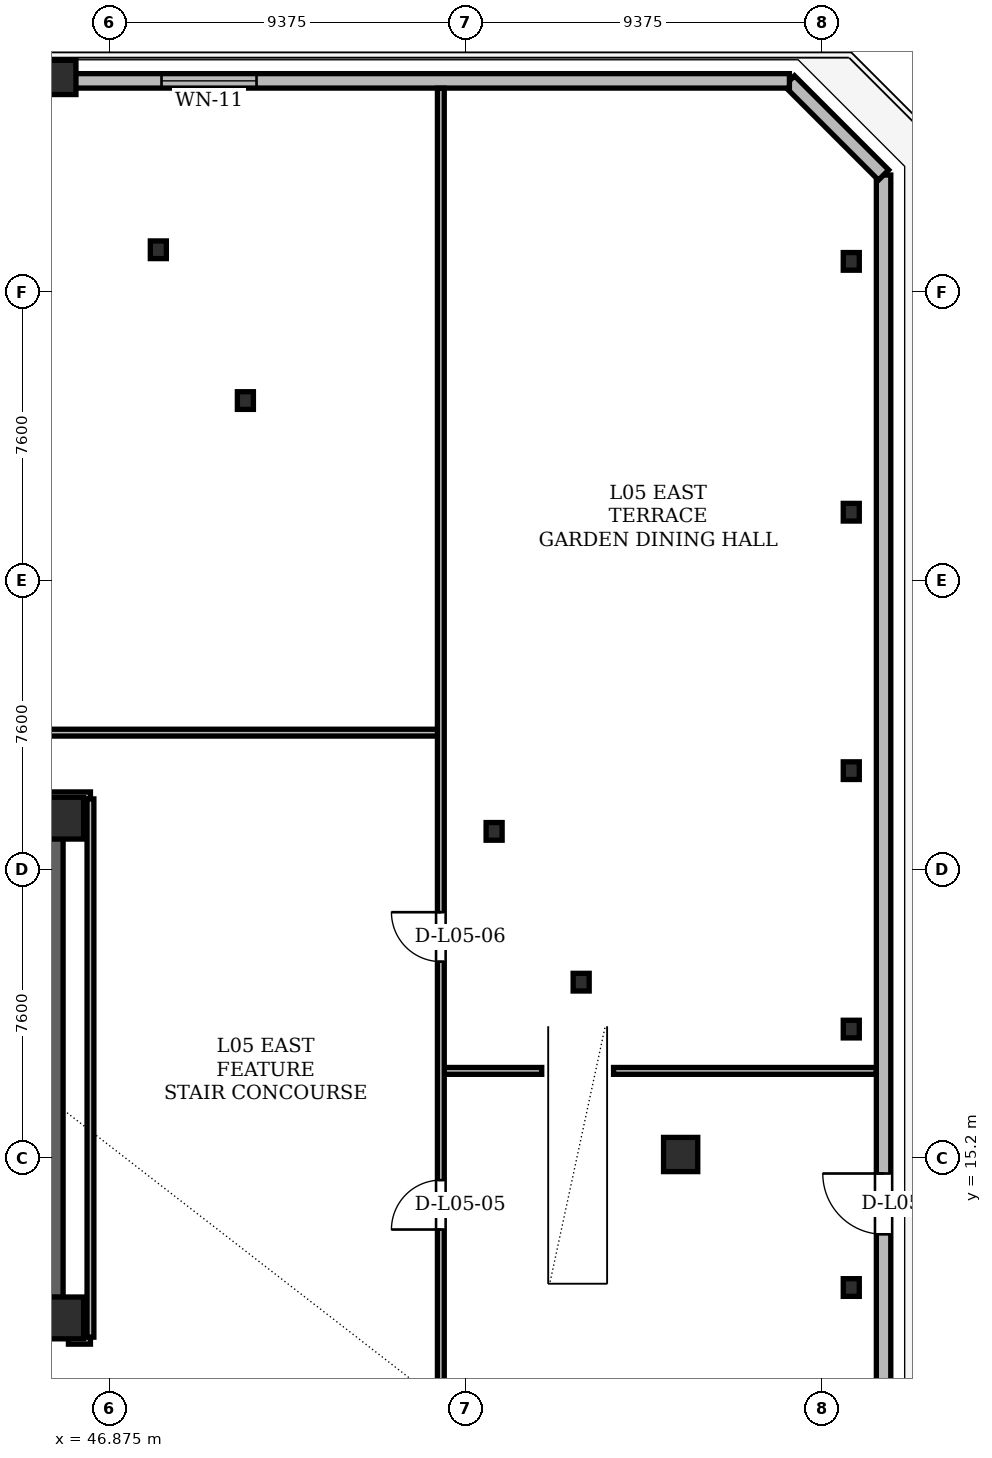
"""IFC4 building model, lengths in metres.
Left out: names, types, materials, properties, quantities, classifications, styles, units other than length and angle.
Written with IfcOpenShell. Run it as: python <this file> out.ifc"""

import sys

from ifc_helpers import new_model, si_unit, direction, frame, frame_2d, origin, origin_2d, place, context, subcontext, project, spatial, rectangle, hollow_rectangle, i_section, extrude, element, fill, save


model = new_model("IFC4")
c1 = context("Model", 3, precision=1e-05, world=origin(), true_north=direction((0.0, 1.0)))
c2 = subcontext(c1, "Body", "Model", "MODEL_VIEW")
j1 = project(units=[si_unit("LENGTHUNIT", "METRE"), si_unit("PLANEANGLEUNIT", "RADIAN")], contexts=[c1])
p1 = place(None, origin())
s1 = spatial("IfcSite", under=j1, at=p1, CompositionType="ELEMENT")
p2 = place(p1, origin())
s2 = spatial("IfcBuilding", under=s1, at=p2, CompositionType="ELEMENT")
p3 = place(p2, frame((0.0, 0.0, 22.5)))
s3 = spatial("IfcBuildingStorey", under=s2, at=p3, CompositionType="ELEMENT", Elevation=22.5)
for number, where, z_axis, x_axis in (
    (1, (45.65, 11.0, 0.0), (0.0, 0.0, 1.0), (1.0, 0.0, 0.0)),
    (2, (45.65, 24.15, 0.0), (0.0, 0.0, 1.0), (1.0, 0.0, 0.0)),
):
    element("IfcColumn", number, at=place(p3, frame(where, z_axis=z_axis, x_axis=x_axis)), inside=s3, PredefinedType="COLUMN", context=c2, shape_type="SweptSolid", body=[
        extrude(hollow_rectangle(XDim=1.1, YDim=1.1, WallThickness=0.09, at=origin_2d()), origin(), (0.0, 0.0, 1.0), 4.8),
    ])
for number, where, z_axis, x_axis in (
    (3, (61.91, 15.3, 0.004), (0.0, 0.0, 1.0), (1.0, 0.0, 0.0)),
    (4, (45.548, 43.64, 0.004), (0.0, 0.0, 1.0), (1.0, 0.0, 0.0)),
):
    element("IfcColumn", number, at=place(p3, frame(where, z_axis=z_axis, x_axis=x_axis)), inside=s3, PredefinedType="COLUMN", context=c2, shape_type="SweptSolid", body=[
        extrude(hollow_rectangle(XDim=0.9, YDim=0.9, WallThickness=0.075, at=origin_2d()), origin(), (0.0, 0.0, 1.0), 4.786),
    ])
for number, where, z_axis, x_axis in (
    (5, (59.292, 19.834, 0.004), (0.0, 0.0, 1.0), (1.0, 0.0, 0.0)),
    (6, (57.002, 23.802, 0.004), (0.0, 0.0, 1.0), (1.0, 0.0, 0.0)),
    (7, (50.457, 35.138, 0.004), (0.0, 0.0, 1.0), (1.0, 0.0, 0.0)),
    (8, (48.166, 39.106, 0.004), (0.0, 0.0, 1.0), (1.0, 0.0, 0.0)),
):
    element("IfcColumn", number, at=place(p3, frame(where, z_axis=z_axis, x_axis=x_axis)), inside=s3, PredefinedType="COLUMN", context=c2, shape_type="SweptSolid", body=[
        extrude(i_section(OverallWidth=0.422, OverallDepth=0.465, WebThickness=0.045, FlangeThickness=0.072, at=origin_2d()), origin(), (0.0, 0.0, 1.0), 4.791),
    ])
for number, where, z_axis, x_axis in (
    (9, (66.4, 11.8, 0.0), (0.0, 0.0, 1.0), (1.0, 0.0, 0.0)),
    (10, (66.4, 18.6, 0.0), (0.0, 0.0, 1.0), (1.0, 0.0, 0.0)),
    (11, (66.4, 25.4, 0.0), (0.0, 0.0, 1.0), (1.0, 0.0, 0.0)),
    (12, (66.4, 32.2, 0.0), (0.0, 0.0, 1.0), (1.0, 0.0, 0.0)),
    (13, (66.4, 38.8, 0.0), (0.0, 0.0, 1.0), (1.0, 0.0, 0.0)),
):
    element("IfcColumn", number, at=place(p3, frame(where, z_axis=z_axis, x_axis=x_axis)), inside=s3, PredefinedType="COLUMN", context=c2, shape_type="SweptSolid", body=[
        extrude(i_section(OverallWidth=0.422, OverallDepth=0.465, WebThickness=0.045, FlangeThickness=0.072, at=origin_2d()), origin(), (0.0, 0.0, 1.0), 4.8),
    ])
p4 = place(p3, frame((45.36, 11.0, 0.0), z_axis=(0.0, 0.0, 1.0), x_axis=(0.0, 1.0, 0.0)))
e14 = element("IfcWall", 14, at=p4, inside=s3, PredefinedType="SHEAR", context=c2, shape_type="SweptSolid", body=[
    extrude(rectangle(XDim=13.3, YDim=0.6, at=frame_2d((6.65, 0.0))), origin(), (0.0, 0.0, 1.0), 4.56),
])
p5 = place(p3, frame((38.55, 11.24, 0.0), z_axis=(0.0, 0.0, 1.0), x_axis=(1.0, 0.0, 0.0)))
e15 = element("IfcWall", 15, at=p5, inside=s3, PredefinedType="SHEAR", context=c2, shape_type="SweptSolid", body=[
    extrude(rectangle(XDim=7.1, YDim=0.6, at=frame_2d((3.55, 0.0))), origin(), (0.0, 0.0, 1.0), 4.56),
])
p6 = place(p3, frame((67.25, 4.528, 0.0), z_axis=(0.0, 0.0, 1.0), x_axis=(0.0, 1.0, 0.0)))
e16 = element("IfcWall", 16, at=p6, inside=s3, PredefinedType="SOLIDWALL", context=c2, shape_type="SweptSolid", body=[
    extrude(rectangle(XDim=36.544, YDim=0.38, at=frame_2d((18.272, 0.0))), origin(), (0.0, 0.0, 1.0), 4.56),
])
p7 = place(p6, frame((8.672, 0.0, 0.0)))
e17 = element("IfcOpeningElement", 17, at=p7, cuts=e16, PredefinedType="OPENING", context=c2, shape_type="SweptSolid", body=[
    extrude(rectangle(XDim=1.6, YDim=2.2, at=frame_2d((0.8, 1.1))), frame((0.0, 0.19, 0.0), z_axis=(0.0, -1.0, 0.0), x_axis=(1.0, 0.0, 0.0)), (0.0, 0.0, 1.0), 0.38),
])
p8 = place(p3, frame((67.25, 41.072, 0.0), z_axis=(0.0, 0.0, 1.0), x_axis=(-0.707106781187, 0.707106781187, 0.0)))
e18 = element("IfcWall", 18, at=p8, inside=s3, PredefinedType="SOLIDWALL", context=c2, shape_type="SweptSolid", body=[
    extrude(rectangle(XDim=3.504, YDim=0.38, at=frame_2d((1.752, 0.0))), origin(), (0.0, 0.0, 1.0), 4.56),
])
p9 = place(p3, frame((64.772, 43.55, 0.0), z_axis=(0.0, 0.0, 1.0), x_axis=(-1.0, 0.0, 0.0)))
e19 = element("IfcWall", 19, at=p9, inside=s3, PredefinedType="SOLIDWALL", context=c2, shape_type="SweptSolid", body=[
    extrude(rectangle(XDim=54.544, YDim=0.38, at=frame_2d((27.272, 0.0))), origin(), (0.0, 0.0, 1.0), 3.35),
])
p10 = place(p9, frame((14.022, 0.0, 0.85)))
e20 = element("IfcOpeningElement", 20, at=p10, cuts=e19, PredefinedType="OPENING", context=c2, shape_type="SweptSolid", body=[
    extrude(rectangle(XDim=2.5, YDim=2.15, at=frame_2d((1.25, 1.075))), frame((0.0, 0.19, 0.0), z_axis=(0.0, -1.0, 0.0), x_axis=(1.0, 0.0, 0.0)), (0.0, 0.0, 1.0), 0.38),
])
p11 = place(p9, frame((38.022, 0.0, 0.85)))
e21 = element("IfcOpeningElement", 21, at=p11, cuts=e19, PredefinedType="OPENING", context=c2, shape_type="SweptSolid", body=[
    extrude(rectangle(XDim=2.5, YDim=2.15, at=frame_2d((1.25, 1.075))), frame((0.0, 0.19, 0.0), z_axis=(0.0, -1.0, 0.0), x_axis=(1.0, 0.0, 0.0)), (0.0, 0.0, 1.0), 0.38),
])
p12 = place(p3, frame((45.8, 10.4, 0.0), z_axis=(0.0, 0.0, 1.0), x_axis=(1.0, 0.0, 0.0)))
e22 = element("IfcWall", 22, at=p12, inside=s3, PredefinedType="PARTITIONING", context=c2, shape_type="SweptSolid", body=[
    extrude(rectangle(XDim=0.58, YDim=0.18, at=frame_2d((0.29, 0.0))), origin(), (0.0, 0.0, 1.0), 3.623),
])
p13 = place(p3, frame((55.6, 17.5, 0.0), z_axis=(0.0, 0.0, 1.0), x_axis=(1.0, 0.0, 0.0)))
e23 = element("IfcWall", 23, at=p13, inside=s3, PredefinedType="PARTITIONING", context=c2, shape_type="SweptSolid", body=[
    extrude(rectangle(XDim=2.655, YDim=0.18, at=frame_2d((1.327, 0.0))), origin(), (0.0, 0.0, 1.0), 4.56),
])
p14 = place(p3, frame((60.145, 17.5, 0.0), z_axis=(0.0, 0.0, 1.0), x_axis=(1.0, 0.0, 0.0)))
e24 = element("IfcWall", 24, at=p14, inside=s3, PredefinedType="PARTITIONING", context=c2, shape_type="SweptSolid", body=[
    extrude(rectangle(XDim=6.911, YDim=0.18, at=frame_2d((3.456, 0.0))), origin(), (0.0, 0.0, 1.0), 3.35),
])
p15 = place(p3, frame((28.62, 24.75, 0.0), z_axis=(0.0, 0.0, 1.0), x_axis=(1.0, 0.0, 0.0)))
e25 = element("IfcWall", 25, at=p15, inside=s3, PredefinedType="PARTITIONING", context=c2, shape_type="SweptSolid", body=[
    extrude(rectangle(XDim=17.76, YDim=0.18, at=frame_2d((8.88, 0.0))), origin(), (0.0, 0.0, 1.0), 3.623),
])
p16 = place(p3, frame((27.05, 26.4, 0.0), z_axis=(0.0, 0.0, 1.0), x_axis=(1.0, 0.0, 0.0)))
e26 = element("IfcWall", 26, at=p16, inside=s3, PredefinedType="PARTITIONING", context=c2, shape_type="SweptSolid", body=[
    extrude(rectangle(XDim=28.55, YDim=0.18, at=frame_2d((14.275, 0.0))), origin(), (0.0, 0.0, 1.0), 3.35),
])
p17 = place(p16, frame((2.885, 0.0, 0.0)))
e27 = element("IfcOpeningElement", 27, at=p17, cuts=e26, PredefinedType="OPENING", context=c2, shape_type="SweptSolid", body=[
    extrude(rectangle(XDim=0.88, YDim=2.08, at=frame_2d((0.44, 1.04))), frame((0.0, 0.09, 0.0), z_axis=(0.0, -1.0, 0.0), x_axis=(1.0, 0.0, 0.0)), (0.0, 0.0, 1.0), 0.18),
])
p18 = place(p16, frame((8.36, 0.0, 0.0)))
e28 = element("IfcOpeningElement", 28, at=p18, cuts=e26, PredefinedType="OPENING", context=c2, shape_type="SweptSolid", body=[
    extrude(rectangle(XDim=0.88, YDim=2.08, at=frame_2d((0.44, 1.04))), frame((0.0, 0.09, 0.0), z_axis=(0.0, -1.0, 0.0), x_axis=(1.0, 0.0, 0.0)), (0.0, 0.0, 1.0), 0.18),
])
p19 = place(p3, frame((46.38, 10.494, 0.0), z_axis=(0.0, 0.0, 1.0), x_axis=(0.0, 1.0, 0.0)))
e29 = element("IfcWall", 29, at=p19, inside=s3, PredefinedType="PARTITIONING", context=c2, shape_type="SweptSolid", body=[
    extrude(rectangle(XDim=14.162, YDim=0.18, at=frame_2d((7.081, 0.0))), origin(), (0.0, 0.0, 1.0), 4.56),
])
p20 = place(p3, frame((55.6, 2.244, 0.0), z_axis=(0.0, 0.0, 1.0), x_axis=(0.0, 1.0, 0.0)))
e30 = element("IfcWall", 30, at=p20, inside=s3, PredefinedType="PARTITIONING", context=c2, shape_type="SweptSolid", body=[
    extrude(rectangle(XDim=41.112, YDim=0.18, at=frame_2d((20.556, 0.0))), origin(), (0.0, 0.0, 1.0), 3.35),
])
p21 = place(p20, frame((11.082, 0.0, 0.0)))
e31 = element("IfcOpeningElement", 31, at=p21, cuts=e30, PredefinedType="OPENING", context=c2, shape_type="SweptSolid", body=[
    extrude(rectangle(XDim=1.3, YDim=2.2, at=frame_2d((0.65, 1.1))), frame((0.0, 0.09, 0.0), z_axis=(0.0, -1.0, 0.0), x_axis=(1.0, 0.0, 0.0)), (0.0, 0.0, 1.0), 0.18),
])
p22 = place(p20, frame((18.132, 0.0, 0.0)))
e32 = element("IfcOpeningElement", 32, at=p22, cuts=e30, PredefinedType="OPENING", context=c2, shape_type="SweptSolid", body=[
    extrude(rectangle(XDim=1.3, YDim=2.2, at=frame_2d((0.65, 1.1))), frame((0.0, 0.09, 0.0), z_axis=(0.0, -1.0, 0.0), x_axis=(1.0, 0.0, 0.0)), (0.0, 0.0, 1.0), 0.18),
])
p23 = place(p7, origin())
e33 = element("IfcDoor", 33, at=p23, inside=s3, OperationType="SINGLE_SWING_RIGHT", PredefinedType="DOOR", context=c2, shape_type="SweptSolid", body=[
    extrude(rectangle(XDim=1.6, YDim=2.2, at=frame_2d((0.8, 1.1))), frame((0.0, 0.025, 0.0), z_axis=(0.0, -1.0, 0.0), x_axis=(1.0, 0.0, 0.0)), (0.0, 0.0, 1.0), 0.05),
])
fill(e17, e33)
p24 = place(p10, origin())
e34 = element("IfcWindow", 34, at=p24, inside=s3, PartitioningType="SINGLE_PANEL", PredefinedType="WINDOW", context=c2, shape_type="SweptSolid", body=[
    extrude(rectangle(XDim=2.5, YDim=2.15, at=frame_2d((1.25, 1.075))), frame((0.0, 0.03, 0.0), z_axis=(0.0, -1.0, 0.0), x_axis=(1.0, 0.0, 0.0)), (0.0, 0.0, 1.0), 0.06),
])
fill(e20, e34)
p25 = place(p21, origin())
e35 = element("IfcDoor", 35, at=p25, inside=s3, OperationType="SINGLE_SWING_LEFT", PredefinedType="DOOR", context=c2, shape_type="SweptSolid", body=[
    extrude(rectangle(XDim=1.3, YDim=2.2, at=frame_2d((0.65, 1.1))), frame((0.0, 0.025, 0.0), z_axis=(0.0, -1.0, 0.0), x_axis=(1.0, 0.0, 0.0)), (0.0, 0.0, 1.0), 0.05),
])
fill(e31, e35)
p26 = place(p22, origin())
e36 = element("IfcDoor", 36, at=p26, inside=s3, OperationType="SINGLE_SWING_RIGHT", PredefinedType="DOOR", context=c2, shape_type="SweptSolid", body=[
    extrude(rectangle(XDim=1.3, YDim=2.2, at=frame_2d((0.65, 1.1))), frame((0.0, 0.025, 0.0), z_axis=(0.0, -1.0, 0.0), x_axis=(1.0, 0.0, 0.0)), (0.0, 0.0, 1.0), 0.05),
])
fill(e32, e36)
save(model, sys.argv[1])
